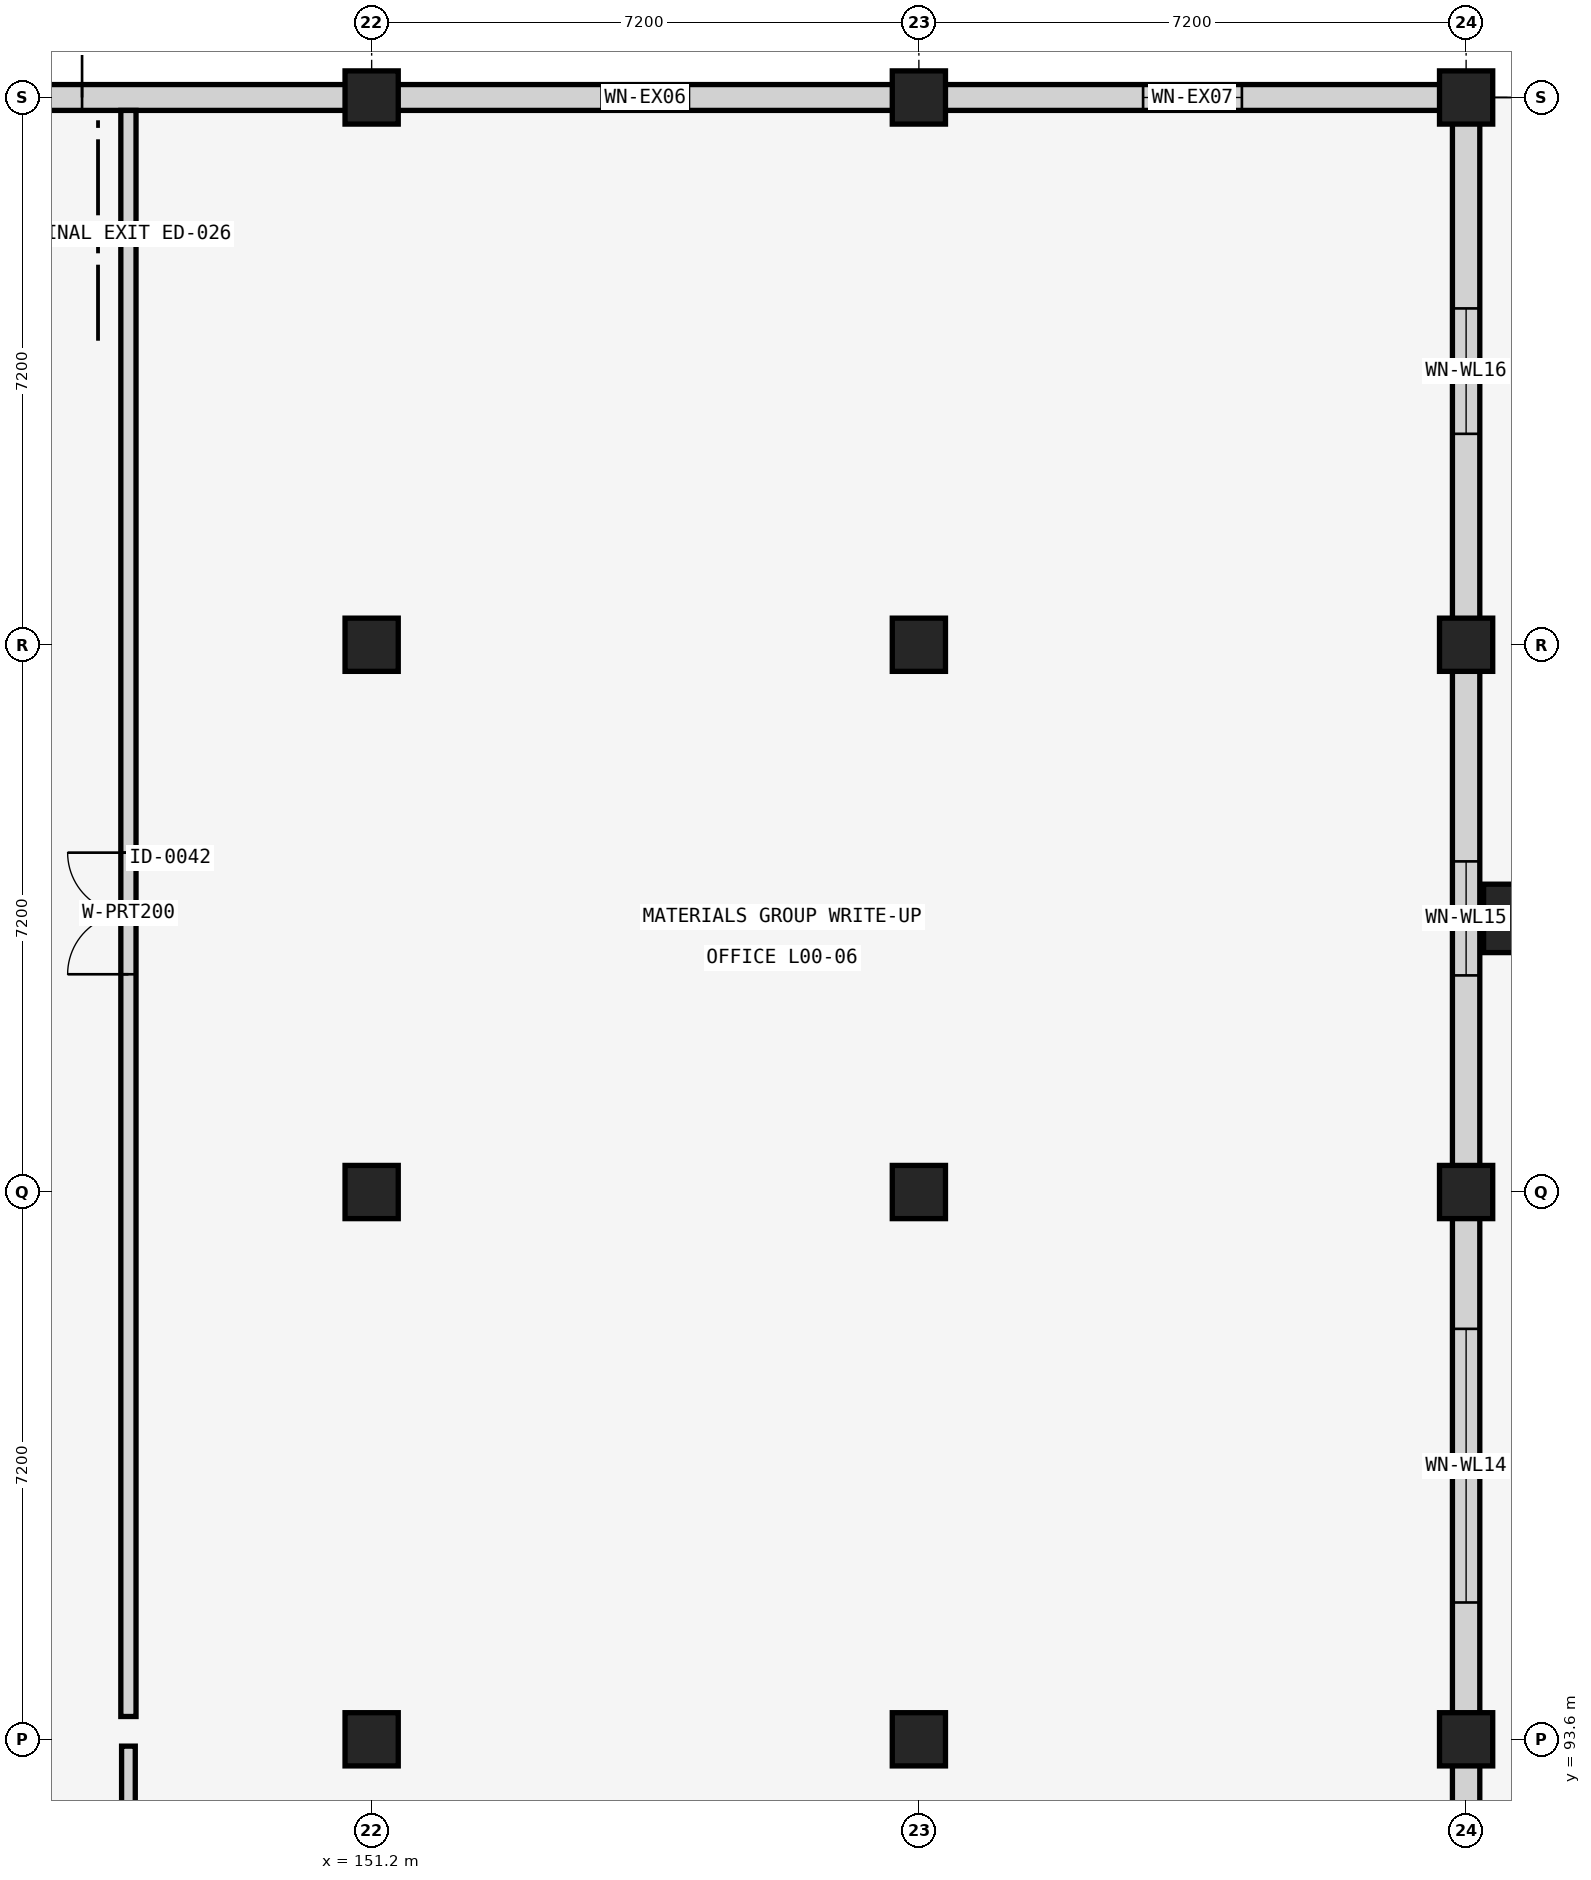
"""IFC4 building model, lengths in metres.
Left out: names, types, materials, properties, quantities, classifications, styles, units other than length and angle.
Written with IfcOpenShell. Run it as: python <this file> out.ifc"""

import sys

from ifc_helpers import new_model, si_unit, direction, frame, frame_2d, origin, origin_2d, place, context, subcontext, project, spatial, rectangle, extrude, element, fill, save


model = new_model("IFC4")
c1 = context("Model", 3, precision=1e-05, world=origin(), true_north=direction((0.0, 1.0)))
c2 = subcontext(c1, "Body", "Model", "MODEL_VIEW")
j1 = project(units=[si_unit("LENGTHUNIT", "METRE"), si_unit("PLANEANGLEUNIT", "RADIAN")], contexts=[c1])
p1 = place(None, origin())
s1 = spatial("IfcSite", under=j1, at=p1, CompositionType="ELEMENT")
p2 = place(p1, origin())
s2 = spatial("IfcBuilding", under=s1, at=p2, CompositionType="ELEMENT")
p3 = place(p2, origin())
s3 = spatial("IfcBuildingStorey", under=s2, at=p3, CompositionType="ELEMENT", Elevation=0.0)
for number, where, z_axis, x_axis in (
    (1, (151.2, 93.6, 0.0), (0.0, 0.0, 1.0), (1.0, 0.0, 0.0)),
    (2, (151.2, 100.8, 0.0), (0.0, 0.0, 1.0), (1.0, 0.0, 0.0)),
    (3, (151.2, 108.0, 0.0), (0.0, 0.0, 1.0), (1.0, 0.0, 0.0)),
    (4, (151.2, 115.2, 0.0), (0.0, 0.0, 1.0), (1.0, 0.0, 0.0)),
    (5, (158.4, 93.6, 0.0), (0.0, 0.0, 1.0), (1.0, 0.0, 0.0)),
    (6, (158.4, 100.8, 0.0), (0.0, 0.0, 1.0), (1.0, 0.0, 0.0)),
    (7, (158.4, 108.0, 0.0), (0.0, 0.0, 1.0), (1.0, 0.0, 0.0)),
    (8, (158.4, 115.2, 0.0), (0.0, 0.0, 1.0), (1.0, 0.0, 0.0)),
    (9, (165.6, 93.6, 0.0), (0.0, 0.0, 1.0), (1.0, 0.0, 0.0)),
    (10, (165.6, 100.8, 0.0), (0.0, 0.0, 1.0), (1.0, 0.0, 0.0)),
    (11, (165.6, 108.0, 0.0), (0.0, 0.0, 1.0), (1.0, 0.0, 0.0)),
    (12, (165.6, 115.2, 0.0), (0.0, 0.0, 1.0), (1.0, 0.0, 0.0)),
):
    element("IfcColumn", number, at=place(p3, frame(where, z_axis=z_axis, x_axis=x_axis)), inside=s3, PredefinedType="COLUMN", context=c2, shape_type="SweptSolid", body=[
        extrude(rectangle(XDim=0.7, YDim=0.7, at=origin_2d()), origin(), (0.0, 0.0, 1.0), 4.8),
    ])
p4 = place(p3, frame((166.08, 104.4, 0.0), z_axis=(0.0, 0.0, 1.0), x_axis=(1.0, 0.0, 0.0)))
e13 = element("IfcColumn", 13, at=p4, inside=s3, PredefinedType="PILASTER", context=c2, shape_type="SweptSolid", body=[
    extrude(rectangle(XDim=0.5, YDim=0.9, at=origin_2d()), origin(), (0.0, 0.0, 1.0), 4.8),
])
p5 = place(p3, frame((165.6, 86.74, 0.0), z_axis=(0.0, 0.0, 1.0), x_axis=(0.0, 1.0, 0.0)))
e14 = element("IfcWall", 14, at=p5, inside=s3, PredefinedType="SOLIDWALL", context=c2, shape_type="SweptSolid", body=[
    extrude(rectangle(XDim=6.52, YDim=0.36, at=frame_2d((3.26, 0.0))), origin(), (0.0, 0.0, 1.0), 3.75),
])
p6 = place(p5, frame((1.61, 0.0, 0.95)))
e15 = element("IfcOpeningElement", 15, at=p6, cuts=e14, PredefinedType="OPENING", context=c2, shape_type="SweptSolid", body=[
    extrude(rectangle(XDim=3.3, YDim=1.8, at=frame_2d((1.65, 0.9))), frame((0.0, 0.19, 0.0), z_axis=(0.0, -1.0, 0.0), x_axis=(1.0, 0.0, 0.0)), (0.0, 0.0, 1.0), 0.38),
])
p7 = place(p3, frame((165.6, 93.94, 0.0), z_axis=(0.0, 0.0, 1.0), x_axis=(0.0, 1.0, 0.0)))
e16 = element("IfcWall", 16, at=p7, inside=s3, PredefinedType="SOLIDWALL", context=c2, shape_type="SweptSolid", body=[
    extrude(rectangle(XDim=6.52, YDim=0.36, at=frame_2d((3.26, 0.0))), origin(), (0.0, 0.0, 1.0), 3.75),
])
p8 = place(p7, frame((1.46, 0.0, 0.95)))
e17 = element("IfcOpeningElement", 17, at=p8, cuts=e16, PredefinedType="OPENING", context=c2, shape_type="SweptSolid", body=[
    extrude(rectangle(XDim=3.6, YDim=1.8, at=frame_2d((1.8, 0.9))), frame((0.0, 0.19, 0.0), z_axis=(0.0, -1.0, 0.0), x_axis=(1.0, 0.0, 0.0)), (0.0, 0.0, 1.0), 0.38),
])
p9 = place(p3, frame((165.6, 101.14, 0.0), z_axis=(0.0, 0.0, 1.0), x_axis=(0.0, 1.0, 0.0)))
e18 = element("IfcWall", 18, at=p9, inside=s3, PredefinedType="SOLIDWALL", context=c2, shape_type="SweptSolid", body=[
    extrude(rectangle(XDim=6.52, YDim=0.36, at=frame_2d((3.26, 0.0))), origin(), (0.0, 0.0, 1.0), 3.75),
])
p10 = place(p9, frame((2.51, 0.0, 0.95)))
e19 = element("IfcOpeningElement", 19, at=p10, cuts=e18, PredefinedType="OPENING", context=c2, shape_type="SweptSolid", body=[
    extrude(rectangle(XDim=1.5, YDim=1.8, at=frame_2d((0.75, 0.9))), frame((0.0, 0.19, 0.0), z_axis=(0.0, -1.0, 0.0), x_axis=(1.0, 0.0, 0.0)), (0.0, 0.0, 1.0), 0.38),
])
p11 = place(p3, frame((165.6, 108.34, 0.0), z_axis=(0.0, 0.0, 1.0), x_axis=(0.0, 1.0, 0.0)))
e20 = element("IfcWall", 20, at=p11, inside=s3, PredefinedType="SOLIDWALL", context=c2, shape_type="SweptSolid", body=[
    extrude(rectangle(XDim=6.52, YDim=0.36, at=frame_2d((3.26, 0.0))), origin(), (0.0, 0.0, 1.0), 3.75),
])
p12 = place(p11, frame((2.435, 0.0, 0.95)))
e21 = element("IfcOpeningElement", 21, at=p12, cuts=e20, PredefinedType="OPENING", context=c2, shape_type="SweptSolid", body=[
    extrude(rectangle(XDim=1.65, YDim=1.95, at=frame_2d((0.825, 0.975))), frame((0.0, 0.19, 0.0), z_axis=(0.0, -1.0, 0.0), x_axis=(1.0, 0.0, 0.0)), (0.0, 0.0, 1.0), 0.38),
])
p13 = place(p3, frame((144.34, 115.2, 0.0), z_axis=(0.0, 0.0, 1.0), x_axis=(1.0, 0.0, 0.0)))
e22 = element("IfcWall", 22, at=p13, inside=s3, PredefinedType="SOLIDWALL", context=c2, shape_type="SweptSolid", body=[
    extrude(rectangle(XDim=6.52, YDim=0.34, at=frame_2d((3.26, 0.0))), origin(), (0.0, 0.0, 1.0), 3.75),
])
p14 = place(p13, frame((1.25, 0.0, 0.0)))
e23 = element("IfcOpeningElement", 23, at=p14, cuts=e22, PredefinedType="OPENING", context=c2, shape_type="SweptSolid", body=[
    extrude(rectangle(XDim=1.8, YDim=2.4, at=frame_2d((0.9, 1.2))), frame((0.0, 0.18, 0.0), z_axis=(0.0, -1.0, 0.0), x_axis=(1.0, 0.0, 0.0)), (0.0, 0.0, 1.0), 0.36),
])
p15 = place(p3, frame((151.54, 115.2, 0.0), z_axis=(0.0, 0.0, 1.0), x_axis=(1.0, 0.0, 0.0)))
e24 = element("IfcWall", 24, at=p15, inside=s3, PredefinedType="SOLIDWALL", context=c2, shape_type="SweptSolid", body=[
    extrude(rectangle(XDim=6.52, YDim=0.34, at=frame_2d((3.26, 0.0))), origin(), (0.0, 0.0, 1.0), 3.75),
])
p16 = place(p15, frame((2.685, 0.0, 0.95)))
e25 = element("IfcOpeningElement", 25, at=p16, cuts=e24, PredefinedType="OPENING", context=c2, shape_type="SweptSolid", body=[
    extrude(rectangle(XDim=1.15, YDim=2.0, at=frame_2d((0.575, 1.0))), frame((0.0, 0.18, 0.0), z_axis=(0.0, -1.0, 0.0), x_axis=(1.0, 0.0, 0.0)), (0.0, 0.0, 1.0), 0.36),
])
p17 = place(p3, frame((158.74, 115.2, 0.0), z_axis=(0.0, 0.0, 1.0), x_axis=(1.0, 0.0, 0.0)))
e26 = element("IfcWall", 26, at=p17, inside=s3, PredefinedType="SOLIDWALL", context=c2, shape_type="SweptSolid", body=[
    extrude(rectangle(XDim=6.52, YDim=0.34, at=frame_2d((3.26, 0.0))), origin(), (0.0, 0.0, 1.0), 3.75),
])
p18 = place(p17, frame((2.61, 0.0, 0.95)))
e27 = element("IfcOpeningElement", 27, at=p18, cuts=e26, PredefinedType="OPENING", context=c2, shape_type="SweptSolid", body=[
    extrude(rectangle(XDim=1.3, YDim=2.0, at=frame_2d((0.65, 1.0))), frame((0.0, 0.18, 0.0), z_axis=(0.0, -1.0, 0.0), x_axis=(1.0, 0.0, 0.0)), (0.0, 0.0, 1.0), 0.36),
])
p19 = place(p3, frame((148.0, 72.29, 0.0), z_axis=(0.0, 0.0, 1.0), x_axis=(0.0, 1.0, 0.0)))
e28 = element("IfcWall", 28, at=p19, inside=s3, PredefinedType="PARTITIONING", context=c2, shape_type="SweptSolid", body=[
    extrude(rectangle(XDim=21.22, YDim=0.18, at=frame_2d((10.61, 0.0))), origin(), (0.0, 0.0, 1.0), 3.75),
])
p20 = place(p19, frame((9.86, 0.0, 0.0)))
e29 = element("IfcOpeningElement", 29, at=p20, cuts=e28, PredefinedType="OPENING", context=c2, shape_type="SweptSolid", body=[
    extrude(rectangle(XDim=1.5, YDim=2.2, at=frame_2d((0.75, 1.1))), frame((0.0, 0.1, 0.0), z_axis=(0.0, -1.0, 0.0), x_axis=(1.0, 0.0, 0.0)), (0.0, 0.0, 1.0), 0.2),
])
p21 = place(p3, frame((148.0, 93.9, 0.0), z_axis=(0.0, 0.0, 1.0), x_axis=(0.0, 1.0, 0.0)))
e30 = element("IfcWall", 30, at=p21, inside=s3, PredefinedType="PARTITIONING", context=c2, shape_type="SweptSolid", body=[
    extrude(rectangle(XDim=21.13, YDim=0.2, at=frame_2d((10.565, 0.0))), origin(), (0.0, 0.0, 1.0), 3.75),
])
p22 = place(p21, frame((9.765, 0.0, 0.0)))
e31 = element("IfcOpeningElement", 31, at=p22, cuts=e30, PredefinedType="OPENING", context=c2, shape_type="SweptSolid", body=[
    extrude(rectangle(XDim=1.6, YDim=2.25, at=frame_2d((0.8, 1.125))), frame((0.0, 0.11, 0.0), z_axis=(0.0, -1.0, 0.0), x_axis=(1.0, 0.0, 0.0)), (0.0, 0.0, 1.0), 0.22),
])
p23 = place(p8, origin())
e32 = element("IfcWindow", 32, at=p23, inside=s3, PartitioningType="SINGLE_PANEL", PredefinedType="WINDOW", context=c2, shape_type="SweptSolid", body=[
    extrude(rectangle(XDim=3.6, YDim=1.8, at=frame_2d((1.8, 0.9))), frame((0.0, 0.03, 0.0), z_axis=(0.0, -1.0, 0.0), x_axis=(1.0, 0.0, 0.0)), (0.0, 0.0, 1.0), 0.06),
])
fill(e17, e32)
p24 = place(p10, origin())
e33 = element("IfcWindow", 33, at=p24, inside=s3, PartitioningType="SINGLE_PANEL", PredefinedType="WINDOW", context=c2, shape_type="SweptSolid", body=[
    extrude(rectangle(XDim=1.5, YDim=1.8, at=frame_2d((0.75, 0.9))), frame((0.0, 0.03, 0.0), z_axis=(0.0, -1.0, 0.0), x_axis=(1.0, 0.0, 0.0)), (0.0, 0.0, 1.0), 0.06),
])
fill(e19, e33)
p25 = place(p12, origin())
e34 = element("IfcWindow", 34, at=p25, inside=s3, PartitioningType="SINGLE_PANEL", PredefinedType="WINDOW", context=c2, shape_type="SweptSolid", body=[
    extrude(rectangle(XDim=1.65, YDim=1.95, at=frame_2d((0.825, 0.975))), frame((0.0, 0.03, 0.0), z_axis=(0.0, -1.0, 0.0), x_axis=(1.0, 0.0, 0.0)), (0.0, 0.0, 1.0), 0.06),
])
fill(e21, e34)
p26 = place(p14, origin())
e35 = element("IfcDoor", 35, at=p26, inside=s3, OperationType="DOUBLE_DOOR_SINGLE_SWING", PredefinedType="DOOR", context=c2, shape_type="SweptSolid", body=[
    extrude(rectangle(XDim=1.8, YDim=2.4, at=frame_2d((0.9, 1.2))), frame((0.0, 0.025, 0.0), z_axis=(0.0, -1.0, 0.0), x_axis=(1.0, 0.0, 0.0)), (0.0, 0.0, 1.0), 0.05),
])
fill(e23, e35)
p27 = place(p16, origin())
e36 = element("IfcWindow", 36, at=p27, inside=s3, PartitioningType="SINGLE_PANEL", PredefinedType="WINDOW", context=c2, shape_type="SweptSolid", body=[
    extrude(rectangle(XDim=1.15, YDim=2.0, at=frame_2d((0.575, 1.0))), frame((0.0, 0.03, 0.0), z_axis=(0.0, -1.0, 0.0), x_axis=(1.0, 0.0, 0.0)), (0.0, 0.0, 1.0), 0.06),
])
fill(e25, e36)
p28 = place(p18, origin())
e37 = element("IfcWindow", 37, at=p28, inside=s3, PartitioningType="SINGLE_PANEL", PredefinedType="WINDOW", context=c2, shape_type="SweptSolid", body=[
    extrude(rectangle(XDim=1.3, YDim=2.0, at=frame_2d((0.65, 1.0))), frame((0.0, 0.03, 0.0), z_axis=(0.0, -1.0, 0.0), x_axis=(1.0, 0.0, 0.0)), (0.0, 0.0, 1.0), 0.06),
])
fill(e27, e37)
p29 = place(p22, origin())
e38 = element("IfcDoor", 38, at=p29, inside=s3, OperationType="DOUBLE_DOOR_SINGLE_SWING", PredefinedType="DOOR", context=c2, shape_type="SweptSolid", body=[
    extrude(rectangle(XDim=1.6, YDim=2.25, at=frame_2d((0.8, 1.125))), frame((0.0, 0.025, 0.0), z_axis=(0.0, -1.0, 0.0), x_axis=(1.0, 0.0, 0.0)), (0.0, 0.0, 1.0), 0.05),
])
fill(e31, e38)
save(model, sys.argv[1])
